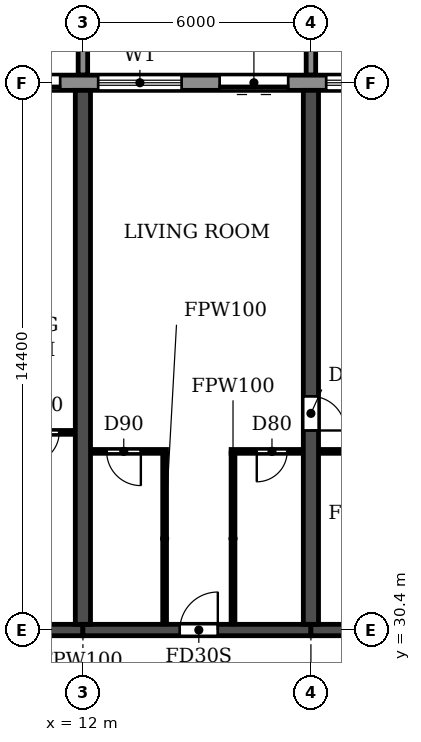
"""IFC4 building model, lengths in metres.
Left out: names, types, materials, properties, quantities, classifications, styles, units other than length and angle.
Written with IfcOpenShell. Run it as: python <this file> out.ifc"""

import sys

from ifc_helpers import new_model, si_unit, direction, frame, frame_2d, origin, place, context, subcontext, project, spatial, polyline, rectangle, outline, extrude, source, transform, mapped, element, fill, save


model = new_model("IFC4")
c1 = context("Model", 3, precision=1e-05, world=origin(), true_north=direction((0.0, 1.0)))
c2 = subcontext(c1, "Body", "Model", "MODEL_VIEW")
j1 = project(units=[si_unit("LENGTHUNIT", "METRE"), si_unit("PLANEANGLEUNIT", "RADIAN")], contexts=[c1])
p1 = place(None, origin())
s1 = spatial("IfcSite", under=j1, at=p1, CompositionType="ELEMENT")
p2 = place(p1, origin())
s2 = spatial("IfcBuilding", under=s1, at=p2, CompositionType="ELEMENT")
p3 = place(p2, frame((0.0, 0.0, 33.3)))
s3 = spatial("IfcBuildingStorey", under=s2, at=p3, CompositionType="ELEMENT", Elevation=33.3)
p4 = place(p3, frame((12.0, 30.55, 0.0), z_axis=(0.0, 0.0, 1.0), x_axis=(0.0, 1.0, 0.0)))
e1 = element("IfcWall", 1, at=p4, inside=s3, PredefinedType="SHEAR", context=c2, shape_type="SweptSolid", body=[
    extrude(rectangle(XDim=14.05, YDim=0.4, at=frame_2d((7.025, 0.0))), origin(), (0.0, 0.0, 1.0), 3.05),
])
p5 = place(p3, frame((18.0, 30.55, 0.0), z_axis=(0.0, 0.0, 1.0), x_axis=(0.0, 1.0, 0.0)))
e2 = element("IfcWall", 2, at=p5, inside=s3, PredefinedType="SHEAR", context=c2, shape_type="SweptSolid", body=[
    extrude(rectangle(XDim=14.05, YDim=0.4, at=frame_2d((7.025, 0.0))), origin(), (0.0, 0.0, 1.0), 3.05),
])
p6 = place(p5, frame((5.1, 0.0, 0.0)))
e3 = element("IfcOpeningElement", 3, at=p6, cuts=e2, PredefinedType="OPENING", context=c2, shape_type="SweptSolid", body=[
    extrude(rectangle(XDim=0.9, YDim=2.1, at=frame_2d((0.45, 1.05))), frame((0.0, 0.21, 0.0), z_axis=(0.0, -1.0, 0.0), x_axis=(1.0, 0.0, 0.0)), (0.0, 0.0, 1.0), 0.42),
])
p7 = place(p3, frame((6.0, 30.4, 0.0), z_axis=(0.0, 0.0, 1.0), x_axis=(1.0, 0.0, 0.0)))
e4 = element("IfcWall", 4, at=p7, inside=s3, PredefinedType="SHEAR", context=c2, shape_type="SweptSolid", body=[
    extrude(rectangle(XDim=6.0, YDim=0.3, at=frame_2d((3.0, 0.0))), origin(), (0.0, 0.0, 1.0), 2.45),
])
p8 = place(p7, frame((2.55, 0.0, 0.0)))
e5 = element("IfcOpeningElement", 5, at=p8, cuts=e4, PredefinedType="OPENING", context=c2, shape_type="SweptSolid", body=[
    extrude(rectangle(XDim=1.0, YDim=2.1, at=frame_2d((0.5, 1.05))), frame((0.0, 0.16, 0.0), z_axis=(0.0, -1.0, 0.0), x_axis=(1.0, 0.0, 0.0)), (0.0, 0.0, 1.0), 0.32),
])
p9 = place(p3, frame((12.0, 30.4, 0.0), z_axis=(0.0, 0.0, 1.0), x_axis=(1.0, 0.0, 0.0)))
e6 = element("IfcWall", 6, at=p9, inside=s3, PredefinedType="SHEAR", context=c2, shape_type="SweptSolid", body=[
    extrude(rectangle(XDim=6.0, YDim=0.3, at=frame_2d((3.0, 0.0))), origin(), (0.0, 0.0, 1.0), 2.45),
])
p10 = place(p9, frame((2.55, 0.0, 0.0)))
e7 = element("IfcOpeningElement", 7, at=p10, cuts=e6, PredefinedType="OPENING", context=c2, shape_type="SweptSolid", body=[
    extrude(rectangle(XDim=1.0, YDim=2.1, at=frame_2d((0.5, 1.05))), frame((0.0, 0.16, 0.0), z_axis=(0.0, -1.0, 0.0), x_axis=(1.0, 0.0, 0.0)), (0.0, 0.0, 1.0), 0.32),
])
p11 = place(p3, frame((18.0, 30.4, 0.0), z_axis=(0.0, 0.0, 1.0), x_axis=(1.0, 0.0, 0.0)))
e8 = element("IfcWall", 8, at=p11, inside=s3, PredefinedType="SHEAR", context=c2, shape_type="SweptSolid", body=[
    extrude(rectangle(XDim=6.0, YDim=0.3, at=frame_2d((3.0, 0.0))), origin(), (0.0, 0.0, 1.0), 2.45),
])
p12 = place(p3, frame((97.317, 44.8, 0.0), z_axis=(0.0, 0.0, 1.0), x_axis=(-1.0, 0.0, 0.0)))
e9 = element("IfcWall", 9, at=p12, inside=s3, PredefinedType="STANDARD", context=c2, shape_type="SweptSolid", body=[
    extrude(rectangle(XDim=92.634, YDim=0.4, at=frame_2d((46.317, 0.0))), origin(), (0.0, 0.0, 1.0), 3.05),
])
p13 = place(p12, frame((88.717, 0.0, 0.9)))
e10 = element("IfcOpeningElement", 10, at=p13, cuts=e9, PredefinedType="OPENING", context=c2, shape_type="SweptSolid", body=[
    extrude(rectangle(XDim=2.2, YDim=1.5, at=frame_2d((1.1, 0.75))), frame((0.0, 0.21, 0.0), z_axis=(0.0, -1.0, 0.0), x_axis=(1.0, 0.0, 0.0)), (0.0, 0.0, 1.0), 0.42),
])
p14 = place(p12, frame((85.917, 0.0, 0.0)))
e11 = element("IfcOpeningElement", 11, at=p14, cuts=e9, PredefinedType="OPENING", context=c2, shape_type="SweptSolid", body=[
    extrude(rectangle(XDim=1.8, YDim=2.4, at=frame_2d((0.9, 1.2))), frame((0.0, 0.21, 0.0), z_axis=(0.0, -1.0, 0.0), x_axis=(1.0, 0.0, 0.0)), (0.0, 0.0, 1.0), 0.42),
])
p15 = place(p12, frame((82.717, 0.0, 0.9)))
e12 = element("IfcOpeningElement", 12, at=p15, cuts=e9, PredefinedType="OPENING", context=c2, shape_type="SweptSolid", body=[
    extrude(rectangle(XDim=2.2, YDim=1.5, at=frame_2d((1.1, 0.75))), frame((0.0, 0.21, 0.0), z_axis=(0.0, -1.0, 0.0), x_axis=(1.0, 0.0, 0.0)), (0.0, 0.0, 1.0), 0.42),
])
p16 = place(p12, frame((79.917, 0.0, 0.0)))
e13 = element("IfcOpeningElement", 13, at=p16, cuts=e9, PredefinedType="OPENING", context=c2, shape_type="SweptSolid", body=[
    extrude(rectangle(XDim=1.8, YDim=2.4, at=frame_2d((0.9, 1.2))), frame((0.0, 0.21, 0.0), z_axis=(0.0, -1.0, 0.0), x_axis=(1.0, 0.0, 0.0)), (0.0, 0.0, 1.0), 0.42),
])
p17 = place(p12, frame((76.717, 0.0, 0.9)))
e14 = element("IfcOpeningElement", 14, at=p17, cuts=e9, PredefinedType="OPENING", context=c2, shape_type="SweptSolid", body=[
    extrude(rectangle(XDim=2.2, YDim=1.5, at=frame_2d((1.1, 0.75))), frame((0.0, 0.21, 0.0), z_axis=(0.0, -1.0, 0.0), x_axis=(1.0, 0.0, 0.0)), (0.0, 0.0, 1.0), 0.42),
])
p18 = place(p12, frame((73.717, 0.0, 0.9)))
e15 = element("IfcOpeningElement", 15, at=p18, cuts=e9, PredefinedType="OPENING", context=c2, shape_type="SweptSolid", body=[
    extrude(rectangle(XDim=2.2, YDim=1.5, at=frame_2d((1.1, 0.75))), frame((0.0, 0.21, 0.0), z_axis=(0.0, -1.0, 0.0), x_axis=(1.0, 0.0, 0.0)), (0.0, 0.0, 1.0), 0.42),
])
p19 = place(p12, frame((70.717, 0.0, 0.9)))
e16 = element("IfcOpeningElement", 16, at=p19, cuts=e9, PredefinedType="OPENING", context=c2, shape_type="SweptSolid", body=[
    extrude(rectangle(XDim=2.2, YDim=1.5, at=frame_2d((1.1, 0.75))), frame((0.0, 0.21, 0.0), z_axis=(0.0, -1.0, 0.0), x_axis=(1.0, 0.0, 0.0)), (0.0, 0.0, 1.0), 0.42),
])
p20 = place(p12, frame((67.917, 0.0, 0.0)))
e17 = element("IfcOpeningElement", 17, at=p20, cuts=e9, PredefinedType="OPENING", context=c2, shape_type="SweptSolid", body=[
    extrude(rectangle(XDim=1.8, YDim=2.4, at=frame_2d((0.9, 1.2))), frame((0.0, 0.21, 0.0), z_axis=(0.0, -1.0, 0.0), x_axis=(1.0, 0.0, 0.0)), (0.0, 0.0, 1.0), 0.42),
])
p21 = place(p12, frame((64.717, 0.0, 0.9)))
e18 = element("IfcOpeningElement", 18, at=p21, cuts=e9, PredefinedType="OPENING", context=c2, shape_type="SweptSolid", body=[
    extrude(rectangle(XDim=2.2, YDim=1.5, at=frame_2d((1.1, 0.75))), frame((0.0, 0.21, 0.0), z_axis=(0.0, -1.0, 0.0), x_axis=(1.0, 0.0, 0.0)), (0.0, 0.0, 1.0), 0.42),
])
p22 = place(p12, frame((61.717, 0.0, 0.9)))
e19 = element("IfcOpeningElement", 19, at=p22, cuts=e9, PredefinedType="OPENING", context=c2, shape_type="SweptSolid", body=[
    extrude(rectangle(XDim=2.2, YDim=1.5, at=frame_2d((1.1, 0.75))), frame((0.0, 0.21, 0.0), z_axis=(0.0, -1.0, 0.0), x_axis=(1.0, 0.0, 0.0)), (0.0, 0.0, 1.0), 0.42),
])
p23 = place(p12, frame((58.717, 0.0, 0.9)))
e20 = element("IfcOpeningElement", 20, at=p23, cuts=e9, PredefinedType="OPENING", context=c2, shape_type="SweptSolid", body=[
    extrude(rectangle(XDim=2.2, YDim=1.5, at=frame_2d((1.1, 0.75))), frame((0.0, 0.21, 0.0), z_axis=(0.0, -1.0, 0.0), x_axis=(1.0, 0.0, 0.0)), (0.0, 0.0, 1.0), 0.42),
])
p24 = place(p12, frame((55.917, 0.0, 0.0)))
e21 = element("IfcOpeningElement", 21, at=p24, cuts=e9, PredefinedType="OPENING", context=c2, shape_type="SweptSolid", body=[
    extrude(rectangle(XDim=1.8, YDim=2.4, at=frame_2d((0.9, 1.2))), frame((0.0, 0.21, 0.0), z_axis=(0.0, -1.0, 0.0), x_axis=(1.0, 0.0, 0.0)), (0.0, 0.0, 1.0), 0.42),
])
p25 = place(p12, frame((52.717, 0.0, 0.9)))
e22 = element("IfcOpeningElement", 22, at=p25, cuts=e9, PredefinedType="OPENING", context=c2, shape_type="SweptSolid", body=[
    extrude(rectangle(XDim=2.2, YDim=1.5, at=frame_2d((1.1, 0.75))), frame((0.0, 0.21, 0.0), z_axis=(0.0, -1.0, 0.0), x_axis=(1.0, 0.0, 0.0)), (0.0, 0.0, 1.0), 0.42),
])
p26 = place(p12, frame((49.717, 0.0, 0.9)))
e23 = element("IfcOpeningElement", 23, at=p26, cuts=e9, PredefinedType="OPENING", context=c2, shape_type="SweptSolid", body=[
    extrude(rectangle(XDim=2.2, YDim=1.5, at=frame_2d((1.1, 0.75))), frame((0.0, 0.21, 0.0), z_axis=(0.0, -1.0, 0.0), x_axis=(1.0, 0.0, 0.0)), (0.0, 0.0, 1.0), 0.42),
])
p27 = place(p12, frame((46.717, 0.0, 0.9)))
e24 = element("IfcOpeningElement", 24, at=p27, cuts=e9, PredefinedType="OPENING", context=c2, shape_type="SweptSolid", body=[
    extrude(rectangle(XDim=2.2, YDim=1.5, at=frame_2d((1.1, 0.75))), frame((0.0, 0.21, 0.0), z_axis=(0.0, -1.0, 0.0), x_axis=(1.0, 0.0, 0.0)), (0.0, 0.0, 1.0), 0.42),
])
p28 = place(p12, frame((43.917, 0.0, 0.0)))
e25 = element("IfcOpeningElement", 25, at=p28, cuts=e9, PredefinedType="OPENING", context=c2, shape_type="SweptSolid", body=[
    extrude(rectangle(XDim=1.8, YDim=2.4, at=frame_2d((0.9, 1.2))), frame((0.0, 0.21, 0.0), z_axis=(0.0, -1.0, 0.0), x_axis=(1.0, 0.0, 0.0)), (0.0, 0.0, 1.0), 0.42),
])
p29 = place(p12, frame((40.717, 0.0, 0.9)))
e26 = element("IfcOpeningElement", 26, at=p29, cuts=e9, PredefinedType="OPENING", context=c2, shape_type="SweptSolid", body=[
    extrude(rectangle(XDim=2.2, YDim=1.5, at=frame_2d((1.1, 0.75))), frame((0.0, 0.21, 0.0), z_axis=(0.0, -1.0, 0.0), x_axis=(1.0, 0.0, 0.0)), (0.0, 0.0, 1.0), 0.42),
])
p30 = place(p12, frame((37.717, 0.0, 0.9)))
e27 = element("IfcOpeningElement", 27, at=p30, cuts=e9, PredefinedType="OPENING", context=c2, shape_type="SweptSolid", body=[
    extrude(rectangle(XDim=2.2, YDim=1.5, at=frame_2d((1.1, 0.75))), frame((0.0, 0.21, 0.0), z_axis=(0.0, -1.0, 0.0), x_axis=(1.0, 0.0, 0.0)), (0.0, 0.0, 1.0), 0.42),
])
p31 = place(p12, frame((34.717, 0.0, 0.9)))
e28 = element("IfcOpeningElement", 28, at=p31, cuts=e9, PredefinedType="OPENING", context=c2, shape_type="SweptSolid", body=[
    extrude(rectangle(XDim=2.2, YDim=1.5, at=frame_2d((1.1, 0.75))), frame((0.0, 0.21, 0.0), z_axis=(0.0, -1.0, 0.0), x_axis=(1.0, 0.0, 0.0)), (0.0, 0.0, 1.0), 0.42),
])
p32 = place(p12, frame((31.917, 0.0, 0.0)))
e29 = element("IfcOpeningElement", 29, at=p32, cuts=e9, PredefinedType="OPENING", context=c2, shape_type="SweptSolid", body=[
    extrude(rectangle(XDim=1.8, YDim=2.4, at=frame_2d((0.9, 1.2))), frame((0.0, 0.21, 0.0), z_axis=(0.0, -1.0, 0.0), x_axis=(1.0, 0.0, 0.0)), (0.0, 0.0, 1.0), 0.42),
])
p33 = place(p12, frame((28.717, 0.0, 0.9)))
e30 = element("IfcOpeningElement", 30, at=p33, cuts=e9, PredefinedType="OPENING", context=c2, shape_type="SweptSolid", body=[
    extrude(rectangle(XDim=2.2, YDim=1.5, at=frame_2d((1.1, 0.75))), frame((0.0, 0.21, 0.0), z_axis=(0.0, -1.0, 0.0), x_axis=(1.0, 0.0, 0.0)), (0.0, 0.0, 1.0), 0.42),
])
p34 = place(p12, frame((25.717, 0.0, 0.9)))
e31 = element("IfcOpeningElement", 31, at=p34, cuts=e9, PredefinedType="OPENING", context=c2, shape_type="SweptSolid", body=[
    extrude(rectangle(XDim=2.2, YDim=1.5, at=frame_2d((1.1, 0.75))), frame((0.0, 0.21, 0.0), z_axis=(0.0, -1.0, 0.0), x_axis=(1.0, 0.0, 0.0)), (0.0, 0.0, 1.0), 0.42),
])
p35 = place(p12, frame((22.917, 0.0, 0.0)))
e32 = element("IfcOpeningElement", 32, at=p35, cuts=e9, PredefinedType="OPENING", context=c2, shape_type="SweptSolid", body=[
    extrude(rectangle(XDim=1.8, YDim=2.4, at=frame_2d((0.9, 1.2))), frame((0.0, 0.21, 0.0), z_axis=(0.0, -1.0, 0.0), x_axis=(1.0, 0.0, 0.0)), (0.0, 0.0, 1.0), 0.42),
])
p36 = place(p12, frame((19.717, 0.0, 0.9)))
e33 = element("IfcOpeningElement", 33, at=p36, cuts=e9, PredefinedType="OPENING", context=c2, shape_type="SweptSolid", body=[
    extrude(rectangle(XDim=2.2, YDim=1.5, at=frame_2d((1.1, 0.75))), frame((0.0, 0.21, 0.0), z_axis=(0.0, -1.0, 0.0), x_axis=(1.0, 0.0, 0.0)), (0.0, 0.0, 1.0), 0.42),
])
p37 = place(p12, frame((16.717, 0.0, 0.9)))
e34 = element("IfcOpeningElement", 34, at=p37, cuts=e9, PredefinedType="OPENING", context=c2, shape_type="SweptSolid", body=[
    extrude(rectangle(XDim=2.2, YDim=1.5, at=frame_2d((1.1, 0.75))), frame((0.0, 0.21, 0.0), z_axis=(0.0, -1.0, 0.0), x_axis=(1.0, 0.0, 0.0)), (0.0, 0.0, 1.0), 0.42),
])
p38 = place(p12, frame((13.917, 0.0, 0.0)))
e35 = element("IfcOpeningElement", 35, at=p38, cuts=e9, PredefinedType="OPENING", context=c2, shape_type="SweptSolid", body=[
    extrude(rectangle(XDim=1.8, YDim=2.4, at=frame_2d((0.9, 1.2))), frame((0.0, 0.21, 0.0), z_axis=(0.0, -1.0, 0.0), x_axis=(1.0, 0.0, 0.0)), (0.0, 0.0, 1.0), 0.42),
])
p39 = place(p12, frame((10.717, 0.0, 0.9)))
e36 = element("IfcOpeningElement", 36, at=p39, cuts=e9, PredefinedType="OPENING", context=c2, shape_type="SweptSolid", body=[
    extrude(rectangle(XDim=2.2, YDim=1.5, at=frame_2d((1.1, 0.75))), frame((0.0, 0.21, 0.0), z_axis=(0.0, -1.0, 0.0), x_axis=(1.0, 0.0, 0.0)), (0.0, 0.0, 1.0), 0.42),
])
p40 = place(p12, frame((7.917, 0.0, 0.0)))
e37 = element("IfcOpeningElement", 37, at=p40, cuts=e9, PredefinedType="OPENING", context=c2, shape_type="SweptSolid", body=[
    extrude(rectangle(XDim=1.8, YDim=2.4, at=frame_2d((0.9, 1.2))), frame((0.0, 0.21, 0.0), z_axis=(0.0, -1.0, 0.0), x_axis=(1.0, 0.0, 0.0)), (0.0, 0.0, 1.0), 0.42),
])
p41 = place(p12, frame((4.717, 0.0, 0.9)))
e38 = element("IfcOpeningElement", 38, at=p41, cuts=e9, PredefinedType="OPENING", context=c2, shape_type="SweptSolid", body=[
    extrude(rectangle(XDim=2.2, YDim=1.5, at=frame_2d((1.1, 0.75))), frame((0.0, 0.21, 0.0), z_axis=(0.0, -1.0, 0.0), x_axis=(1.0, 0.0, 0.0)), (0.0, 0.0, 1.0), 0.42),
])
p42 = place(p12, frame((1.917, 0.0, 0.0)))
e39 = element("IfcOpeningElement", 39, at=p42, cuts=e9, PredefinedType="OPENING", context=c2, shape_type="SweptSolid", body=[
    extrude(rectangle(XDim=1.8, YDim=2.4, at=frame_2d((0.9, 1.2))), frame((0.0, 0.21, 0.0), z_axis=(0.0, -1.0, 0.0), x_axis=(1.0, 0.0, 0.0)), (0.0, 0.0, 1.0), 0.42),
])
m1 = source(origin(), c2, "Body", "SweptSolid", [
    extrude(outline(polyline([(0.0, 0.0), (0.25, 0.0), (0.25, 3.1), (0.0, 3.1), (0.0, 0.0)])), origin(), (0.0, 0.0, 1.0), 3.1),
])
for number, where in (
    (40, (11.875, 45.0, 0.0)),
    (41, (17.875, 45.0, 0.0)),
):
    element("IfcWall", number, at=place(p3, frame(where)), inside=s3, PredefinedType="STANDARD", context=c2, shape_type="MappedRepresentation", body=[
        mapped(m1, transform((0.0, 0.0, 0.0))),
    ])
p43 = place(p3, frame((12.21, 35.1, 0.0), z_axis=(0.0, 0.0, 1.0), x_axis=(1.0, 0.0, 0.0)))
e42 = element("IfcWall", 42, at=p43, inside=s3, PredefinedType="PARTITIONING", context=c2, shape_type="SweptSolid", body=[
    extrude(rectangle(XDim=1.99, YDim=0.1, at=frame_2d((0.995, 0.0))), origin(), (0.0, 0.0, 1.0), 3.05),
])
p44 = place(p43, frame((0.415, 0.0, 0.0)))
e43 = element("IfcOpeningElement", 43, at=p44, cuts=e42, PredefinedType="OPENING", context=c2, shape_type="SweptSolid", body=[
    extrude(rectangle(XDim=0.9, YDim=2.1, at=frame_2d((0.45, 1.05))), frame((0.0, 0.06, 0.0), z_axis=(0.0, -1.0, 0.0), x_axis=(1.0, 0.0, 0.0)), (0.0, 0.0, 1.0), 0.12),
])
p45 = place(p3, frame((15.9, 35.1, 0.0), z_axis=(0.0, 0.0, 1.0), x_axis=(1.0, 0.0, 0.0)))
e44 = element("IfcWall", 44, at=p45, inside=s3, PredefinedType="PARTITIONING", context=c2, shape_type="SweptSolid", body=[
    extrude(rectangle(XDim=1.89, YDim=0.1, at=frame_2d((0.945, 0.0))), origin(), (0.0, 0.0, 1.0), 3.05),
])
p46 = place(p45, frame((0.675, 0.0, 0.0)))
e45 = element("IfcOpeningElement", 45, at=p46, cuts=e44, PredefinedType="OPENING", context=c2, shape_type="SweptSolid", body=[
    extrude(rectangle(XDim=0.8, YDim=2.1, at=frame_2d((0.4, 1.05))), frame((0.0, 0.06, 0.0), z_axis=(0.0, -1.0, 0.0), x_axis=(1.0, 0.0, 0.0)), (0.0, 0.0, 1.0), 0.12),
])
p47 = place(p3, frame((18.21, 35.1, 0.0), z_axis=(0.0, 0.0, 1.0), x_axis=(1.0, 0.0, 0.0)))
e46 = element("IfcWall", 46, at=p47, inside=s3, PredefinedType="PARTITIONING", context=c2, shape_type="SweptSolid", body=[
    extrude(rectangle(XDim=2.89, YDim=0.1, at=frame_2d((1.445, 0.0))), origin(), (0.0, 0.0, 1.0), 3.05),
])
p48 = place(p47, frame((0.89, 0.0, 0.0)))
e47 = element("IfcOpeningElement", 47, at=p48, cuts=e46, PredefinedType="OPENING", context=c2, shape_type="SweptSolid", body=[
    extrude(rectangle(XDim=0.8, YDim=2.1, at=frame_2d((0.4, 1.05))), frame((0.0, 0.06, 0.0), z_axis=(0.0, -1.0, 0.0), x_axis=(1.0, 0.0, 0.0)), (0.0, 0.0, 1.0), 0.12),
])
p49 = place(p3, frame((9.9, 35.6, 0.0), z_axis=(0.0, 0.0, 1.0), x_axis=(1.0, 0.0, 0.0)))
e48 = element("IfcWall", 48, at=p49, inside=s3, PredefinedType="PARTITIONING", context=c2, shape_type="SweptSolid", body=[
    extrude(rectangle(XDim=1.89, YDim=0.1, at=frame_2d((0.945, 0.0))), origin(), (0.0, 0.0, 1.0), 3.05),
])
p50 = place(p49, frame((0.675, 0.0, 0.0)))
e49 = element("IfcOpeningElement", 49, at=p50, cuts=e48, PredefinedType="OPENING", context=c2, shape_type="SweptSolid", body=[
    extrude(rectangle(XDim=0.8, YDim=2.1, at=frame_2d((0.4, 1.05))), frame((0.0, 0.06, 0.0), z_axis=(0.0, -1.0, 0.0), x_axis=(1.0, 0.0, 0.0)), (0.0, 0.0, 1.0), 0.12),
])
for number, where, z_axis, x_axis in (
    (50, (14.15, 30.56, 0.0), (0.0, 0.0, 1.0), (0.0, 1.0, 0.0)),
    (51, (15.95, 30.56, 0.0), (0.0, 0.0, 1.0), (0.0, 1.0, 0.0)),
):
    element("IfcWall", number, at=place(p3, frame(where, z_axis=z_axis, x_axis=x_axis)), inside=s3, PredefinedType="PARTITIONING", context=c2, shape_type="SweptSolid", body=[
        extrude(rectangle(XDim=4.49, YDim=0.1, at=frame_2d((2.245, 0.0))), origin(), (0.0, 0.0, 1.0), 3.05),
    ])
p51 = place(p14, origin())
e52 = element("IfcDoor", 52, at=p51, inside=s3, OperationType="DOUBLE_DOOR_SLIDING", PredefinedType="DOOR", context=c2, shape_type="SweptSolid", body=[
    extrude(rectangle(XDim=1.8, YDim=2.4, at=frame_2d((0.9, 1.2))), frame((0.0, 0.025, 0.0), z_axis=(0.0, -1.0, 0.0), x_axis=(1.0, 0.0, 0.0)), (0.0, 0.0, 1.0), 0.05),
])
fill(e11, e52)
p52 = place(p15, origin())
e53 = element("IfcWindow", 53, at=p52, inside=s3, PartitioningType="DOUBLE_PANEL_HORIZONTAL", PredefinedType="WINDOW", context=c2, shape_type="SweptSolid", body=[
    extrude(rectangle(XDim=2.2, YDim=1.5, at=frame_2d((1.1, 0.75))), frame((0.0, 0.03, 0.0), z_axis=(0.0, -1.0, 0.0), x_axis=(1.0, 0.0, 0.0)), (0.0, 0.0, 1.0), 0.06),
])
fill(e12, e53)
p53 = place(p16, origin())
e54 = element("IfcDoor", 54, at=p53, inside=s3, OperationType="DOUBLE_DOOR_SLIDING", PredefinedType="DOOR", context=c2, shape_type="SweptSolid", body=[
    extrude(rectangle(XDim=1.8, YDim=2.4, at=frame_2d((0.9, 1.2))), frame((0.0, 0.025, 0.0), z_axis=(0.0, -1.0, 0.0), x_axis=(1.0, 0.0, 0.0)), (0.0, 0.0, 1.0), 0.05),
])
fill(e13, e54)
p54 = place(p17, origin())
e55 = element("IfcWindow", 55, at=p54, inside=s3, PartitioningType="DOUBLE_PANEL_HORIZONTAL", PredefinedType="WINDOW", context=c2, shape_type="SweptSolid", body=[
    extrude(rectangle(XDim=2.2, YDim=1.5, at=frame_2d((1.1, 0.75))), frame((0.0, 0.03, 0.0), z_axis=(0.0, -1.0, 0.0), x_axis=(1.0, 0.0, 0.0)), (0.0, 0.0, 1.0), 0.06),
])
fill(e14, e55)
p55 = place(p50, frame((0.8, 0.0, 0.0), z_axis=(0.0, 0.0, 1.0), x_axis=(-1.0, 0.0, 0.0)))
e56 = element("IfcDoor", 56, at=p55, inside=s3, OperationType="SINGLE_SWING_RIGHT", PredefinedType="DOOR", context=c2, shape_type="SweptSolid", body=[
    extrude(rectangle(XDim=0.8, YDim=2.1, at=frame_2d((0.4, 1.05))), frame((0.0, 0.025, 0.0), z_axis=(0.0, -1.0, 0.0), x_axis=(1.0, 0.0, 0.0)), (0.0, 0.0, 1.0), 0.05),
])
fill(e49, e56)
p56 = place(p44, frame((0.9, 0.0, 0.0), z_axis=(0.0, 0.0, 1.0), x_axis=(-1.0, 0.0, 0.0)))
e57 = element("IfcDoor", 57, at=p56, inside=s3, OperationType="SINGLE_SWING_LEFT", PredefinedType="DOOR", context=c2, shape_type="SweptSolid", body=[
    extrude(rectangle(XDim=0.9, YDim=2.1, at=frame_2d((0.45, 1.05))), frame((0.0, 0.025, 0.0), z_axis=(0.0, -1.0, 0.0), x_axis=(1.0, 0.0, 0.0)), (0.0, 0.0, 1.0), 0.05),
])
fill(e43, e57)
p57 = place(p10, origin())
e58 = element("IfcDoor", 58, at=p57, inside=s3, OperationType="SINGLE_SWING_RIGHT", PredefinedType="DOOR", context=c2, shape_type="SweptSolid", body=[
    extrude(rectangle(XDim=1.0, YDim=2.1, at=frame_2d((0.5, 1.05))), frame((0.0, 0.025, 0.0), z_axis=(0.0, -1.0, 0.0), x_axis=(1.0, 0.0, 0.0)), (0.0, 0.0, 1.0), 0.05),
])
fill(e7, e58)
p58 = place(p46, frame((0.8, 0.0, 0.0), z_axis=(0.0, 0.0, 1.0), x_axis=(-1.0, 0.0, 0.0)))
e59 = element("IfcDoor", 59, at=p58, inside=s3, OperationType="SINGLE_SWING_RIGHT", PredefinedType="DOOR", context=c2, shape_type="SweptSolid", body=[
    extrude(rectangle(XDim=0.8, YDim=2.1, at=frame_2d((0.4, 1.05))), frame((0.0, 0.025, 0.0), z_axis=(0.0, -1.0, 0.0), x_axis=(1.0, 0.0, 0.0)), (0.0, 0.0, 1.0), 0.05),
])
fill(e45, e59)
p59 = place(p6, frame((0.9, 0.0, 0.0), z_axis=(0.0, 0.0, 1.0), x_axis=(-1.0, 0.0, 0.0)))
e60 = element("IfcDoor", 60, at=p59, inside=s3, OperationType="SINGLE_SWING_RIGHT", PredefinedType="DOOR", context=c2, shape_type="SweptSolid", body=[
    extrude(rectangle(XDim=0.9, YDim=2.1, at=frame_2d((0.45, 1.05))), frame((0.0, 0.025, 0.0), z_axis=(0.0, -1.0, 0.0), x_axis=(1.0, 0.0, 0.0)), (0.0, 0.0, 1.0), 0.05),
])
fill(e3, e60)
save(model, sys.argv[1])
